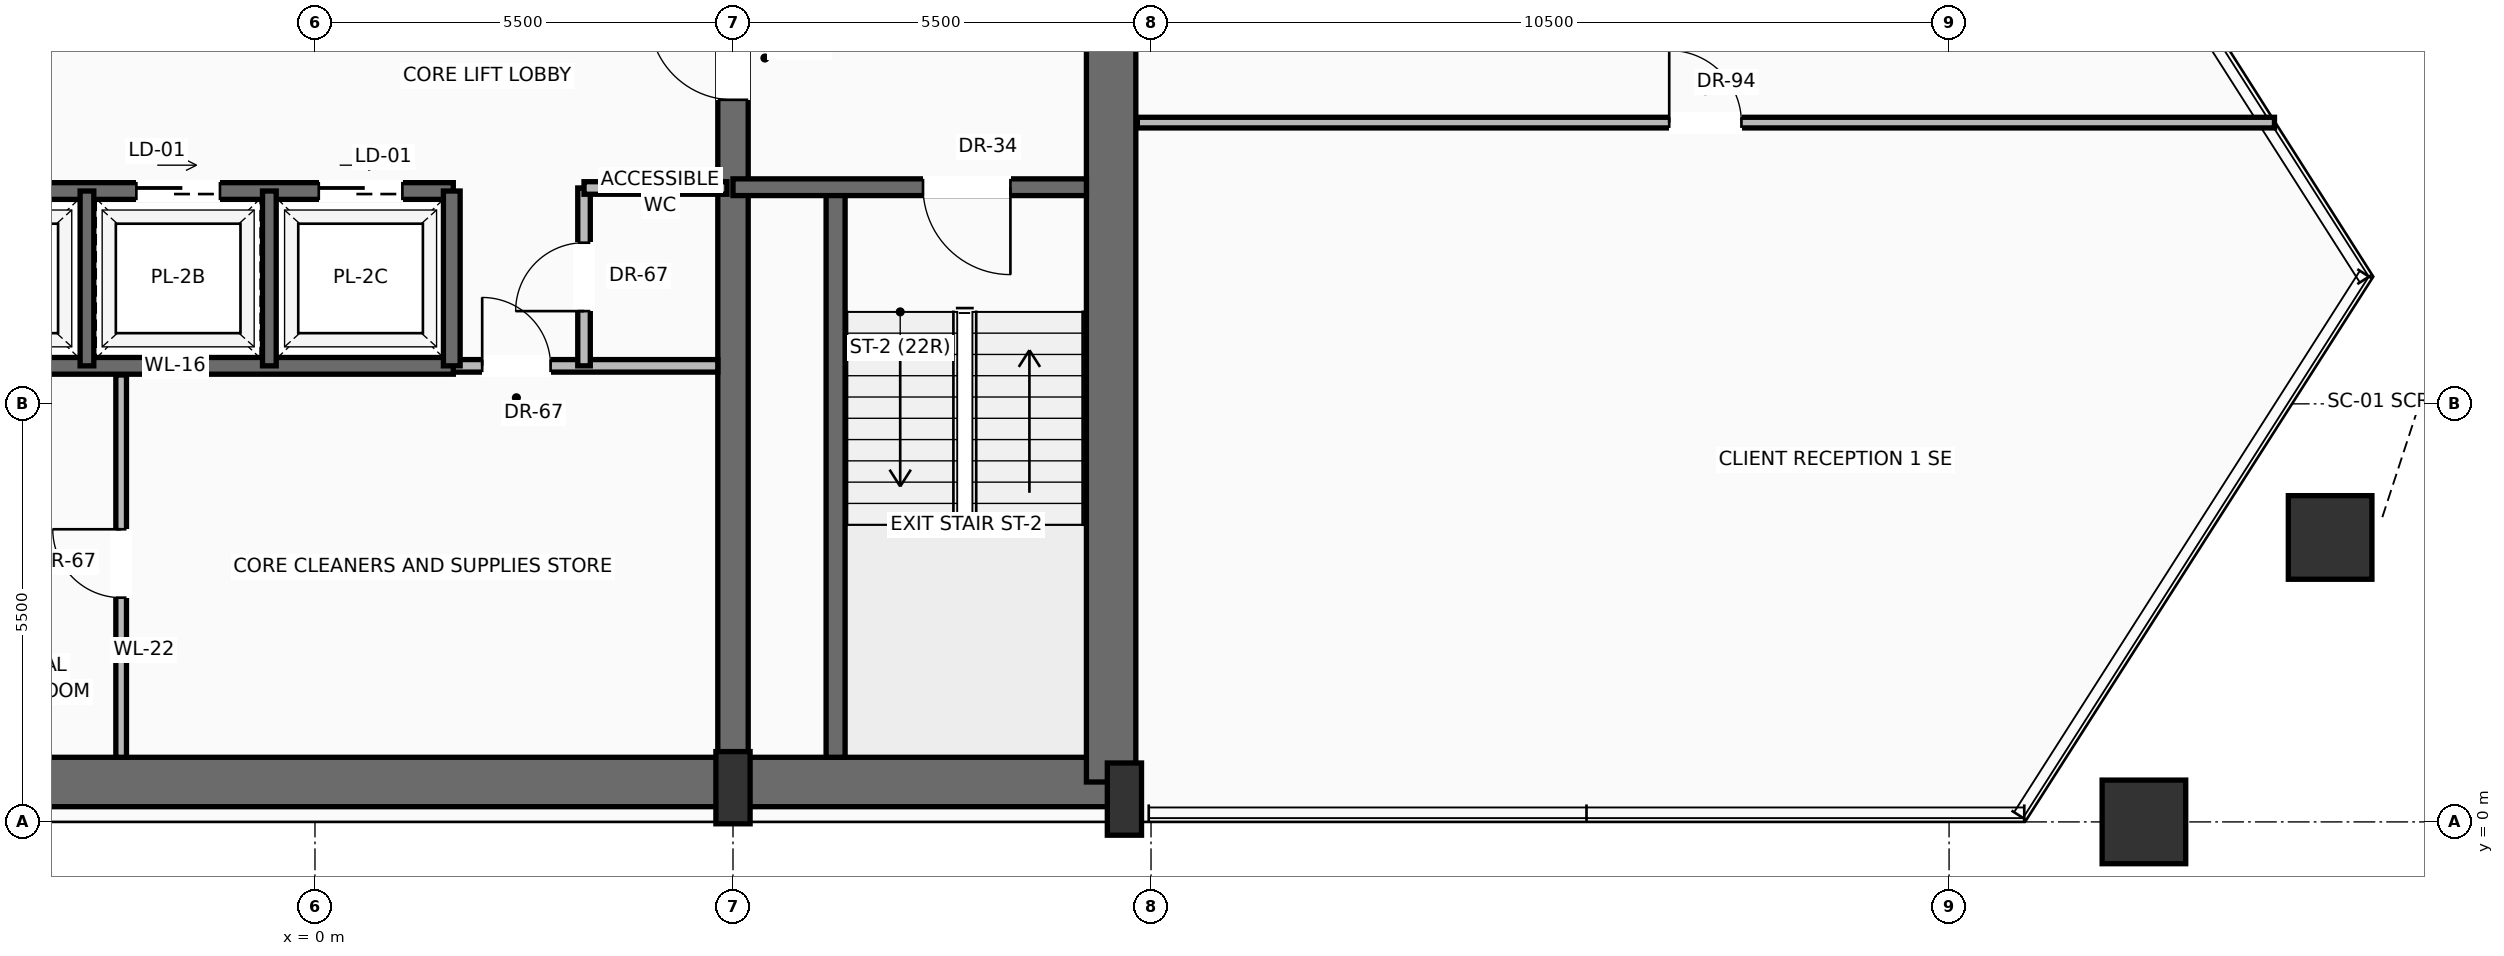
"""IFC4 building model, lengths in metres.
Left out: names, types, materials, properties, quantities, classifications, styles, units other than length and angle.
Written with IfcOpenShell. Run it as: python <this file> out.ifc"""

import sys

from ifc_helpers import new_model, si_unit, direction, frame, frame_2d, origin, origin_2d, place, context, subcontext, project, spatial, rectangle, hollow_rectangle, extrude, source, transform, mapped, element, fill, save


model = new_model("IFC4")
c1 = context("Model", 3, precision=1e-05, world=origin(), true_north=direction((0.0, 1.0)))
c2 = subcontext(c1, "Body", "Model", "MODEL_VIEW")
j1 = project(units=[si_unit("LENGTHUNIT", "METRE"), si_unit("PLANEANGLEUNIT", "RADIAN")], contexts=[c1])
p1 = place(None, origin())
s1 = spatial("IfcSite", under=j1, at=p1, CompositionType="ELEMENT")
p2 = place(p1, origin())
s2 = spatial("IfcBuilding", under=s1, at=p2, CompositionType="ELEMENT")
p3 = place(p2, frame((0.0, 0.0, 158.9)))
s3 = spatial("IfcBuildingStorey", under=s2, at=p3, CompositionType="ELEMENT", Elevation=158.9)
p4 = place(p3, frame((-10.65, 0.525, 0.0), z_axis=(0.0, 0.0, 1.0), x_axis=(1.0, 0.0, 0.0)))
e1 = element("IfcWall", 1, at=p4, inside=s3, PredefinedType="SHEAR", context=c2, shape_type="SweptSolid", body=[
    extrude(rectangle(XDim=21.3, YDim=0.65, at=frame_2d((10.65, 0.0))), origin(), (0.0, 0.0, 1.0), 3.47),
])
p5 = place(p3, frame((10.475, 0.525, 0.0), z_axis=(0.0, 0.0, 1.0), x_axis=(0.0, 1.0, 0.0)))
e2 = element("IfcWall", 2, at=p5, inside=s3, PredefinedType="SHEAR", context=c2, shape_type="SweptSolid", body=[
    extrude(rectangle(XDim=15.55, YDim=0.65, at=frame_2d((7.775, 0.0))), origin(), (0.0, 0.0, 1.0), 3.47),
])
p6 = place(p3, frame((5.5, 0.525, 0.0), z_axis=(0.0, 0.0, 1.0), x_axis=(0.0, 1.0, 0.0)))
e3 = element("IfcWall", 3, at=p6, inside=s3, PredefinedType="SHEAR", context=c2, shape_type="SweptSolid", body=[
    extrude(rectangle(XDim=15.55, YDim=0.4, at=frame_2d((7.775, 0.0))), origin(), (0.0, 0.0, 1.0), 3.47),
])
p7 = place(p6, frame((8.975, 0.0, 0.0)))
e4 = element("IfcOpeningElement", 4, at=p7, cuts=e3, PredefinedType="OPENING", context=c2, shape_type="SweptSolid", body=[
    extrude(rectangle(XDim=1.1, YDim=2.2, at=frame_2d((0.55, 1.1))), frame((0.0, 0.21, 0.0), z_axis=(0.0, -1.0, 0.0), x_axis=(1.0, 0.0, 0.0)), (0.0, 0.0, 1.0), 0.42),
])
m1 = source(origin(), c2, "Body", "SweptSolid", [
    extrude(rectangle(XDim=0.45, YDim=0.95, at=origin_2d()), origin(), (0.0, 0.0, 1.0), 3.7),
])
for number, where, z_axis, x_axis in (
    (5, (5.5, 0.45, 0.0), (0.0, 0.0, 1.0), (1.0, 0.0, 0.0)),
    (6, (10.65, 0.3, 0.0), (0.0, 0.0, 1.0), (1.0, 0.0, 0.0)),
):
    element("IfcColumn", number, at=place(p3, frame(where, z_axis=z_axis, x_axis=x_axis)), inside=s3, PredefinedType="PILASTER", context=c2, shape_type="MappedRepresentation", body=[
        mapped(m1, transform((0.0, 0.0, 0.0), scale=1.0)),
    ])
m2 = source(origin(), c2, "Body", "SweptSolid", [
    extrude(hollow_rectangle(XDim=1.1, YDim=1.1, WallThickness=0.055, at=origin_2d()), origin(), (0.0, 0.0, 1.0), 3.691),
])
p8 = place(p3, frame((24.064, 0.0, 0.004), z_axis=(0.007341072023, 0.0, 0.999973053968), x_axis=(0.0, 1.0, 0.0)))
e7 = element("IfcColumn", 7, at=p8, inside=s3, PredefinedType="COLUMN", context=c2, shape_type="MappedRepresentation", body=[
    mapped(m2, transform((0.0, 0.0, 0.0), scale=1.0)),
])
m3 = source(origin(), c2, "Body", "SweptSolid", [
    extrude(hollow_rectangle(XDim=1.1, YDim=1.1, WallThickness=0.055, at=origin_2d()), origin(), (0.0, 0.0, 1.0), 3.692),
])
p9 = place(p3, frame((26.514, 3.742, 0.004), z_axis=(-0.004893569826, -0.015011356089, 0.999875348312), x_axis=(0.950756672883, -0.309938298649, 0.0)))
e8 = element("IfcColumn", 8, at=p9, inside=s3, PredefinedType="COLUMN", context=c2, shape_type="MappedRepresentation", body=[
    mapped(m3, transform((0.0, 0.0, 0.0), scale=1.0)),
])
p10 = place(p3, frame((6.85, 0.85, 0.0), z_axis=(0.0, 0.0, 1.0), x_axis=(0.0, 1.0, 0.0)))
e9 = element("IfcWall", 9, at=p10, inside=s3, PredefinedType="SOLIDWALL", context=c2, shape_type="SweptSolid", body=[
    extrude(rectangle(XDim=7.5, YDim=0.25, at=frame_2d((3.75, 0.0))), origin(), (0.0, 0.0, 1.0), 3.47),
])
p11 = place(p3, frame((10.15, 8.35, 0.0), z_axis=(0.0, 0.0, 1.0), x_axis=(-1.0, 0.0, 0.0)))
e10 = element("IfcWall", 10, at=p11, inside=s3, PredefinedType="SOLIDWALL", context=c2, shape_type="SweptSolid", body=[
    extrude(rectangle(XDim=4.65, YDim=0.22, at=frame_2d((2.325, 0.0))), origin(), (0.0, 0.0, 1.0), 3.47),
])
p12 = place(p11, frame((1.0, 0.0, 0.0)))
e11 = element("IfcOpeningElement", 11, at=p12, cuts=e10, PredefinedType="OPENING", context=c2, shape_type="SweptSolid", body=[
    extrude(rectangle(XDim=1.15, YDim=2.2, at=frame_2d((0.575, 1.1))), frame((0.0, 0.12, 0.0), z_axis=(0.0, -1.0, 0.0), x_axis=(1.0, 0.0, 0.0)), (0.0, 0.0, 1.0), 0.24),
])
p13 = place(p3, frame((1.82, 6.0, 0.0), z_axis=(0.0, 0.0, 1.0), x_axis=(1.0, 0.0, 0.0)))
e12 = element("IfcWall", 12, at=p13, inside=s3, PredefinedType="PARTITIONING", context=c2, shape_type="SweptSolid", body=[
    extrude(rectangle(XDim=3.48, YDim=0.165, at=frame_2d((1.74, 0.0))), origin(), (0.0, 0.0, 1.0), 3.462),
])
p14 = place(p13, frame((0.38, 0.0, 0.0)))
e13 = element("IfcOpeningElement", 13, at=p14, cuts=e12, PredefinedType="OPENING", context=c2, shape_type="SweptSolid", body=[
    extrude(rectangle(XDim=0.9, YDim=2.1, at=frame_2d((0.45, 1.05))), frame((0.0, 0.093, 0.0), z_axis=(0.0, -1.0, 0.0), x_axis=(1.0, 0.0, 0.0)), (0.0, 0.0, 1.0), 0.185),
])
p15 = place(p3, frame((-2.55, 0.85, 0.0), z_axis=(0.0, 0.0, 1.0), x_axis=(0.0, 1.0, 0.0)))
e14 = element("IfcWall", 14, at=p15, inside=s3, PredefinedType="PARTITIONING", context=c2, shape_type="SweptSolid", body=[
    extrude(rectangle(XDim=5.03, YDim=0.14, at=frame_2d((2.515, 0.0))), origin(), (0.0, 0.0, 1.0), 3.462),
])
p16 = place(p15, frame((2.1, 0.0, 0.0)))
e15 = element("IfcOpeningElement", 15, at=p16, cuts=e14, PredefinedType="OPENING", context=c2, shape_type="SweptSolid", body=[
    extrude(rectangle(XDim=0.9, YDim=2.1, at=frame_2d((0.45, 1.05))), frame((0.0, 0.08, 0.0), z_axis=(0.0, -1.0, 0.0), x_axis=(1.0, 0.0, 0.0)), (0.0, 0.0, 1.0), 0.16),
])
p17 = place(p3, frame((3.54, 6.0, 0.0), z_axis=(0.0, 0.0, 1.0), x_axis=(0.0, 1.0, 0.0)))
e16 = element("IfcWall", 16, at=p17, inside=s3, PredefinedType="PARTITIONING", context=c2, shape_type="SweptSolid", body=[
    extrude(rectangle(XDim=2.34, YDim=0.165, at=frame_2d((1.17, 0.0))), origin(), (0.0, 0.0, 1.0), 3.462),
])
p18 = place(p17, frame((0.72, 0.0, 0.0)))
e17 = element("IfcOpeningElement", 17, at=p18, cuts=e16, PredefinedType="OPENING", context=c2, shape_type="SweptSolid", body=[
    extrude(rectangle(XDim=0.9, YDim=2.1, at=frame_2d((0.45, 1.05))), frame((0.0, 0.093, 0.0), z_axis=(0.0, -1.0, 0.0), x_axis=(1.0, 0.0, 0.0)), (0.0, 0.0, 1.0), 0.185),
])
p19 = place(p3, frame((3.54, 8.34, 0.0), z_axis=(0.0, 0.0, 1.0), x_axis=(1.0, 0.0, 0.0)))
e18 = element("IfcWall", 18, at=p19, inside=s3, PredefinedType="PARTITIONING", context=c2, shape_type="SweptSolid", body=[
    extrude(rectangle(XDim=1.88, YDim=0.165, at=frame_2d((0.94, 0.0))), origin(), (0.0, 0.0, 1.0), 3.462),
])
p20 = place(p3, frame((-5.5, 6.0, 0.0), z_axis=(0.0, 0.0, 1.0), x_axis=(1.0, 0.0, 0.0)))
e19 = element("IfcWall", 19, at=p20, inside=s3, PredefinedType="SOLIDWALL", context=c2, shape_type="SweptSolid", body=[
    extrude(rectangle(XDim=7.32, YDim=0.22, at=frame_2d((3.66, 0.0))), origin(), (0.0, 0.0, 1.0), 3.47),
])
p21 = place(p3, frame((-5.5, 8.3, 0.0), z_axis=(0.0, 0.0, 1.0), x_axis=(1.0, 0.0, 0.0)))
e20 = element("IfcWall", 20, at=p21, inside=s3, PredefinedType="SOLIDWALL", context=c2, shape_type="SweptSolid", body=[
    extrude(rectangle(XDim=7.32, YDim=0.22, at=frame_2d((3.66, 0.0))), origin(), (0.0, 0.0, 1.0), 3.47),
])
p22 = place(p21, frame((0.75, 0.0, 0.0)))
e21 = element("IfcOpeningElement", 21, at=p22, cuts=e20, PredefinedType="OPENING", context=c2, shape_type="SweptSolid", body=[
    extrude(rectangle(XDim=1.1, YDim=2.2, at=frame_2d((0.55, 1.1))), frame((0.0, 0.12, 0.0), z_axis=(0.0, -1.0, 0.0), x_axis=(1.0, 0.0, 0.0)), (0.0, 0.0, 1.0), 0.24),
])
p23 = place(p21, frame((3.15, 0.0, 0.0)))
e22 = element("IfcOpeningElement", 22, at=p23, cuts=e20, PredefinedType="OPENING", context=c2, shape_type="SweptSolid", body=[
    extrude(rectangle(XDim=1.1, YDim=2.2, at=frame_2d((0.55, 1.1))), frame((0.0, 0.12, 0.0), z_axis=(0.0, -1.0, 0.0), x_axis=(1.0, 0.0, 0.0)), (0.0, 0.0, 1.0), 0.24),
])
p24 = place(p21, frame((5.55, 0.0, 0.0)))
e23 = element("IfcOpeningElement", 23, at=p24, cuts=e20, PredefinedType="OPENING", context=c2, shape_type="SweptSolid", body=[
    extrude(rectangle(XDim=1.1, YDim=2.2, at=frame_2d((0.55, 1.1))), frame((0.0, 0.12, 0.0), z_axis=(0.0, -1.0, 0.0), x_axis=(1.0, 0.0, 0.0)), (0.0, 0.0, 1.0), 0.24),
])
p25 = place(p3, frame((1.8, 6.0, 0.0), z_axis=(0.0, 0.0, 1.0), x_axis=(0.0, 1.0, 0.0)))
e24 = element("IfcWall", 24, at=p25, inside=s3, PredefinedType="SOLIDWALL", context=c2, shape_type="SweptSolid", body=[
    extrude(rectangle(XDim=2.3, YDim=0.22, at=frame_2d((1.15, 0.0))), origin(), (0.0, 0.0, 1.0), 3.47),
])
for number, where, z_axis, x_axis in (
    (25, (-3.0, 6.0, 0.0), (0.0, 0.0, 1.0), (0.0, 1.0, 0.0)),
    (26, (-0.6, 6.0, 0.0), (0.0, 0.0, 1.0), (0.0, 1.0, 0.0)),
):
    element("IfcWall", number, at=place(p3, frame(where, z_axis=z_axis, x_axis=x_axis)), inside=s3, PredefinedType="SOLIDWALL", context=c2, shape_type="SweptSolid", body=[
        extrude(rectangle(XDim=2.3, YDim=0.18, at=frame_2d((1.15, 0.0))), origin(), (0.0, 0.0, 1.0), 3.47),
    ])
p26 = place(p3, frame((10.82, 9.2, 0.0), z_axis=(0.0, 0.0, 1.0), x_axis=(1.0, 0.0, 0.0)))
e27 = element("IfcWall", 27, at=p26, inside=s3, PredefinedType="PARTITIONING", context=c2, shape_type="SweptSolid", body=[
    extrude(rectangle(XDim=14.961, YDim=0.14, at=frame_2d((7.481, 0.0))), origin(), (0.0, 0.0, 1.0), 3.462),
])
p27 = place(p26, frame((6.998, 0.0, 0.0)))
e28 = element("IfcOpeningElement", 28, at=p27, cuts=e27, PredefinedType="OPENING", context=c2, shape_type="SweptSolid", body=[
    extrude(rectangle(XDim=0.95, YDim=2.2, at=frame_2d((0.475, 1.1))), frame((0.0, 0.08, 0.0), z_axis=(0.0, -1.0, 0.0), x_axis=(1.0, 0.0, 0.0)), (0.0, 0.0, 1.0), 0.16),
])
m4 = source(origin(), c2, "Body", "SweptSolid", [
    extrude(rectangle(XDim=1.15, YDim=2.2, at=frame_2d((0.575, 1.1))), frame((0.0, 0.025, 0.0), z_axis=(0.0, -1.0, 0.0), x_axis=(1.0, 0.0, 0.0)), (0.0, 0.0, 1.0), 0.05),
])
p28 = place(p12, origin())
e29 = element("IfcDoor", 29, at=p28, inside=s3, OperationType="SINGLE_SWING_LEFT", PredefinedType="DOOR", context=c2, shape_type="MappedRepresentation", body=[
    mapped(m4, transform((0.0, 0.0, 0.0), scale=1.0)),
])
fill(e11, e29)
m5 = source(origin(), c2, "Body", "SweptSolid", [
    extrude(rectangle(XDim=1.1, YDim=2.2, at=frame_2d((0.55, 1.1))), frame((0.0, 0.025, 0.0), z_axis=(0.0, -1.0, 0.0), x_axis=(1.0, 0.0, 0.0)), (0.0, 0.0, 1.0), 0.05),
])
p29 = place(p7, origin())
e30 = element("IfcDoor", 30, at=p29, inside=s3, OperationType="SINGLE_SWING_RIGHT", PredefinedType="DOOR", context=c2, shape_type="MappedRepresentation", body=[
    mapped(m5, transform((0.0, 0.0, 0.0), scale=1.0)),
])
fill(e4, e30)
m6 = source(origin(), c2, "Body", "SweptSolid", [
    extrude(rectangle(XDim=0.9, YDim=2.1, at=frame_2d((0.45, 1.05))), frame((0.0, 0.025, 0.0), z_axis=(0.0, -1.0, 0.0), x_axis=(1.0, 0.0, 0.0)), (0.0, 0.0, 1.0), 0.05),
])
p30 = place(p14, origin())
e31 = element("IfcDoor", 31, at=p30, inside=s3, OperationType="SINGLE_SWING_LEFT", PredefinedType="DOOR", context=c2, shape_type="MappedRepresentation", body=[
    mapped(m6, transform((0.0, 0.0, 0.0), scale=1.0)),
])
fill(e13, e31)
p31 = place(p16, origin())
e32 = element("IfcDoor", 32, at=p31, inside=s3, OperationType="SINGLE_SWING_RIGHT", PredefinedType="DOOR", context=c2, shape_type="MappedRepresentation", body=[
    mapped(m6, transform((0.0, 0.0, 0.0), scale=1.0)),
])
fill(e15, e32)
p32 = place(p18, origin())
e33 = element("IfcDoor", 33, at=p32, inside=s3, OperationType="SINGLE_SWING_LEFT", PredefinedType="DOOR", context=c2, shape_type="MappedRepresentation", body=[
    mapped(m6, transform((0.0, 0.0, 0.0), scale=1.0)),
])
fill(e17, e33)
m7 = source(origin(), c2, "Body", "SweptSolid", [
    extrude(rectangle(XDim=1.1, YDim=2.2, at=frame_2d((0.55, 1.1))), frame((0.0, 0.025, 0.0), z_axis=(0.0, -1.0, 0.0), x_axis=(1.0, 0.0, 0.0)), (0.0, 0.0, 1.0), 0.05),
])
p33 = place(p23, origin())
e34 = element("IfcDoor", 34, at=p33, inside=s3, OperationType="SLIDING_TO_LEFT", PredefinedType="DOOR", context=c2, shape_type="MappedRepresentation", body=[
    mapped(m7, transform((0.0, 0.0, 0.0), scale=1.0)),
])
fill(e22, e34)
p34 = place(p24, origin())
e35 = element("IfcDoor", 35, at=p34, inside=s3, OperationType="SLIDING_TO_LEFT", PredefinedType="DOOR", context=c2, shape_type="MappedRepresentation", body=[
    mapped(m7, transform((0.0, 0.0, 0.0), scale=1.0)),
])
fill(e23, e35)
m8 = source(origin(), c2, "Body", "SweptSolid", [
    extrude(rectangle(XDim=0.95, YDim=2.2, at=frame_2d((0.475, 1.1))), frame((0.0, 0.025, 0.0), z_axis=(0.0, -1.0, 0.0), x_axis=(1.0, 0.0, 0.0)), (0.0, 0.0, 1.0), 0.05),
])
p35 = place(p27, origin())
e36 = element("IfcDoor", 36, at=p35, inside=s3, OperationType="SINGLE_SWING_LEFT", PredefinedType="DOOR", context=c2, shape_type="MappedRepresentation", body=[
    mapped(m8, transform((0.0, 0.0, 0.0), scale=1.0)),
])
fill(e28, e36)
save(model, sys.argv[1])
